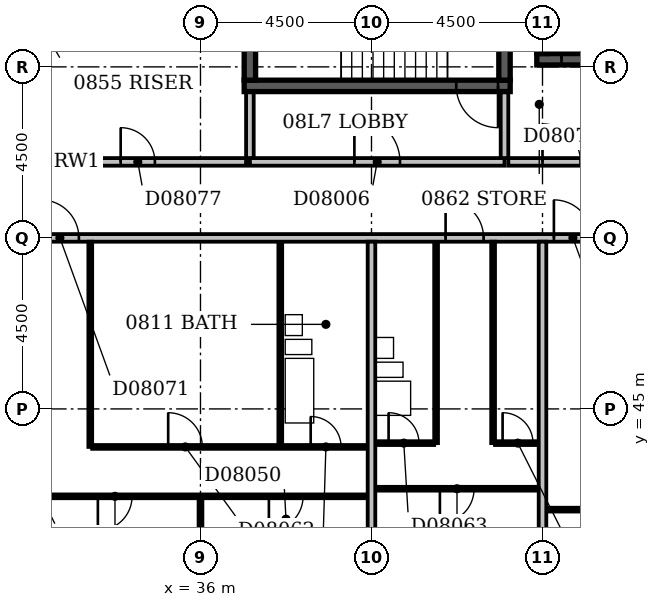
"""IFC4 building model, lengths in metres.
Left out: names, types, materials, properties, quantities, classifications, styles, units other than length and angle.
Written with IfcOpenShell. Run it as: python <this file> out.ifc"""

import sys

from ifc_helpers import new_model, si_unit, direction, frame, frame_2d, origin, place, context, subcontext, project, spatial, rectangle, extrude, element, fill, save


model = new_model("IFC4")
c1 = context("Model", 3, precision=1e-05, world=origin(), true_north=direction((0.0, 1.0)))
c2 = subcontext(c1, "Body", "Model", "MODEL_VIEW")
j1 = project(units=[si_unit("LENGTHUNIT", "METRE"), si_unit("PLANEANGLEUNIT", "RADIAN")], contexts=[c1])
p1 = place(None, origin())
s1 = spatial("IfcSite", under=j1, at=p1, CompositionType="ELEMENT")
p2 = place(p1, origin())
s2 = spatial("IfcBuilding", under=s1, at=p2, CompositionType="ELEMENT")
p3 = place(p2, frame((0.0, 0.0, 39.8)))
s3 = spatial("IfcBuildingStorey", under=s2, at=p3, CompositionType="ELEMENT", Elevation=39.8)
p4 = place(p3, frame((37.15, 53.5, -0.3), z_axis=(0.0, 0.0, 1.0), x_axis=(1.0, 0.0, 0.0)))
e1 = element("IfcWall", 1, at=p4, inside=s3, PredefinedType="SHEAR", context=c2, shape_type="SweptSolid", body=[
    extrude(rectangle(XDim=7.0, YDim=0.3, at=frame_2d((3.5, 0.0))), origin(), (0.0, 0.0, 1.0), 3.6),
])
p5 = place(p4, frame((5.58, 0.0, 0.3)))
e2 = element("IfcOpeningElement", 2, at=p5, cuts=e1, PredefinedType="OPENING", context=c2, shape_type="SweptSolid", body=[
    extrude(rectangle(XDim=1.1, YDim=2.1, at=frame_2d((0.55, 1.05))), frame((0.0, 0.162, 0.0), z_axis=(0.0, -1.0, 0.0), x_axis=(1.0, 0.0, 0.0)), (0.0, 0.0, 1.0), 0.324),
])
for number, where, z_axis, x_axis in (
    (3, (37.3, 53.65, -0.3), (0.0, 0.0, 1.0), (0.0, 1.0, 0.0)),
    (4, (44.0, 53.65, -0.3), (0.0, 0.0, 1.0), (0.0, 1.0, 0.0)),
):
    element("IfcWall", number, at=place(p3, frame(where, z_axis=z_axis, x_axis=x_axis)), inside=s3, PredefinedType="SHEAR", context=c2, shape_type="SweptSolid", body=[
        extrude(rectangle(XDim=4.2, YDim=0.3, at=frame_2d((2.1, 0.0))), origin(), (0.0, 0.0, 1.0), 3.6),
    ])
p6 = place(p3, frame((44.85, 54.2, -0.3), z_axis=(0.0, 0.0, 1.0), x_axis=(1.0, 0.0, 0.0)))
e5 = element("IfcWall", 5, at=p6, inside=s3, PredefinedType="SHEAR", context=c2, shape_type="SweptSolid", body=[
    extrude(rectangle(XDim=2.15, YDim=0.3, at=frame_2d((1.075, 0.0))), origin(), (0.0, 0.0, 1.0), 3.6),
])
p7 = place(p6, frame((0.65, 0.0, 0.3)))
e6 = element("IfcOpeningElement", 6, at=p7, cuts=e5, PredefinedType="OPENING", context=c2, shape_type="SweptSolid", body=[
    extrude(rectangle(XDim=1.0, YDim=2.1, at=frame_2d((0.5, 1.05))), frame((0.0, 0.162, 0.0), z_axis=(0.0, -1.0, 0.0), x_axis=(1.0, 0.0, 0.0)), (0.0, 0.0, 1.0), 0.324),
])
p8 = place(p3, frame((45.0, 54.35, -0.3), z_axis=(0.0, 0.0, 1.0), x_axis=(0.0, 1.0, 0.0)))
e7 = element("IfcWall", 7, at=p8, inside=s3, PredefinedType="SHEAR", context=c2, shape_type="SweptSolid", body=[
    extrude(rectangle(XDim=3.5, YDim=0.3, at=frame_2d((1.75, 0.0))), origin(), (0.0, 0.0, 1.0), 3.6),
])
p9 = place(p3, frame((37.3, 51.5, 0.0), z_axis=(0.0, 0.0, 1.0), x_axis=(1.0, 0.0, 0.0)))
e8 = element("IfcWall", 8, at=p9, inside=s3, PredefinedType="PARTITIONING", context=c2, shape_type="SweptSolid", body=[
    extrude(rectangle(XDim=6.7, YDim=0.2, at=frame_2d((3.35, 0.0))), origin(), (0.0, 0.0, 1.0), 3.3),
])
p10 = place(p9, frame((2.75, 0.0, 0.0)))
e9 = element("IfcOpeningElement", 9, at=p10, cuts=e8, PredefinedType="OPENING", context=c2, shape_type="SweptSolid", body=[
    extrude(rectangle(XDim=1.2, YDim=2.1, at=frame_2d((0.6, 1.05))), frame((0.0, 0.112, 0.0), z_axis=(0.0, -1.0, 0.0), x_axis=(1.0, 0.0, 0.0)), (0.0, 0.0, 1.0), 0.224),
])
for number, where, z_axis, x_axis in (
    (10, (44.0, 51.6, 0.0), (0.0, 0.0, 1.0), (0.0, 1.0, 0.0)),
    (11, (37.3, 51.6, 0.0), (0.0, 0.0, 1.0), (0.0, 1.0, 0.0)),
):
    element("IfcWall", number, at=place(p3, frame(where, z_axis=z_axis, x_axis=x_axis)), inside=s3, PredefinedType="PARTITIONING", context=c2, shape_type="SweptSolid", body=[
        extrude(rectangle(XDim=1.73, YDim=0.2, at=frame_2d((0.865, 0.0))), origin(), (0.0, 0.0, 1.0), 3.3),
    ])
p11 = place(p3, frame((36.0, 36.6, 0.0), z_axis=(0.0, 0.0, 1.0), x_axis=(0.0, 1.0, 0.0)))
e12 = element("IfcWall", 12, at=p11, inside=s3, PredefinedType="PARTITIONING", context=c2, shape_type="SweptSolid", body=[
    extrude(rectangle(XDim=6.05, YDim=0.1, at=frame_2d((3.025, 0.0))), origin(), (0.0, 0.0, 1.0), 2.4),
])
p12 = place(p3, frame((40.5, 36.6, 0.0), z_axis=(0.0, 0.0, 1.0), x_axis=(0.0, 1.0, 0.0)))
e13 = element("IfcWall", 13, at=p12, inside=s3, PredefinedType="PARTITIONING", context=c2, shape_type="SweptSolid", body=[
    extrude(rectangle(XDim=12.8, YDim=0.2, at=frame_2d((6.4, 0.0))), origin(), (0.0, 0.0, 1.0), 3.3),
])
p13 = place(p3, frame((45.0, 36.6, 0.0), z_axis=(0.0, 0.0, 1.0), x_axis=(0.0, 1.0, 0.0)))
e14 = element("IfcWall", 14, at=p13, inside=s3, PredefinedType="PARTITIONING", context=c2, shape_type="SweptSolid", body=[
    extrude(rectangle(XDim=12.8, YDim=0.2, at=frame_2d((6.4, 0.0))), origin(), (0.0, 0.0, 1.0), 2.6),
])
p14 = place(p3, frame((45.1, 42.35, 0.0), z_axis=(0.0, 0.0, 1.0), x_axis=(1.0, 0.0, 0.0)))
e15 = element("IfcWall", 15, at=p14, inside=s3, PredefinedType="PARTITIONING", context=c2, shape_type="SweptSolid", body=[
    extrude(rectangle(XDim=17.8, YDim=0.1, at=frame_2d((8.9, 0.0))), origin(), (0.0, 0.0, 1.0), 3.3),
])
p15 = place(p14, frame((1.7, 0.0, 0.0)))
e16 = element("IfcOpeningElement", 16, at=p15, cuts=e15, PredefinedType="OPENING", context=c2, shape_type="SweptSolid", body=[
    extrude(rectangle(XDim=0.9, YDim=2.1, at=frame_2d((0.45, 1.05))), frame((0.0, 0.062, 0.0), z_axis=(0.0, -1.0, 0.0), x_axis=(1.0, 0.0, 0.0)), (0.0, 0.0, 1.0), 0.124),
])
p16 = place(p14, frame((6.2, 0.0, 0.0)))
e17 = element("IfcOpeningElement", 17, at=p16, cuts=e15, PredefinedType="OPENING", context=c2, shape_type="SweptSolid", body=[
    extrude(rectangle(XDim=0.9, YDim=2.1, at=frame_2d((0.45, 1.05))), frame((0.0, 0.062, 0.0), z_axis=(0.0, -1.0, 0.0), x_axis=(1.0, 0.0, 0.0)), (0.0, 0.0, 1.0), 0.124),
])
p17 = place(p14, frame((10.7, 0.0, 0.0)))
e18 = element("IfcOpeningElement", 18, at=p17, cuts=e15, PredefinedType="OPENING", context=c2, shape_type="SweptSolid", body=[
    extrude(rectangle(XDim=0.9, YDim=2.1, at=frame_2d((0.45, 1.05))), frame((0.0, 0.062, 0.0), z_axis=(0.0, -1.0, 0.0), x_axis=(1.0, 0.0, 0.0)), (0.0, 0.0, 1.0), 0.124),
])
p18 = place(p14, frame((15.2, 0.0, 0.0)))
e19 = element("IfcOpeningElement", 19, at=p18, cuts=e15, PredefinedType="OPENING", context=c2, shape_type="SweptSolid", body=[
    extrude(rectangle(XDim=0.9, YDim=2.1, at=frame_2d((0.45, 1.05))), frame((0.0, 0.062, 0.0), z_axis=(0.0, -1.0, 0.0), x_axis=(1.0, 0.0, 0.0)), (0.0, 0.0, 1.0), 0.124),
])
p19 = place(p3, frame((31.6, 42.7, 0.0), z_axis=(0.0, 0.0, 1.0), x_axis=(1.0, 0.0, 0.0)))
e20 = element("IfcWall", 20, at=p19, inside=s3, PredefinedType="PARTITIONING", context=c2, shape_type="SweptSolid", body=[
    extrude(rectangle(XDim=8.8, YDim=0.1, at=frame_2d((4.4, 0.0))), origin(), (0.0, 0.0, 1.0), 3.3),
])
p20 = place(p19, frame((1.7, 0.0, 0.0)))
e21 = element("IfcOpeningElement", 21, at=p20, cuts=e20, PredefinedType="OPENING", context=c2, shape_type="SweptSolid", body=[
    extrude(rectangle(XDim=0.9, YDim=2.1, at=frame_2d((0.45, 1.05))), frame((0.0, 0.062, 0.0), z_axis=(0.0, -1.0, 0.0), x_axis=(1.0, 0.0, 0.0)), (0.0, 0.0, 1.0), 0.124),
])
p21 = place(p19, frame((6.2, 0.0, 0.0)))
e22 = element("IfcOpeningElement", 22, at=p21, cuts=e20, PredefinedType="OPENING", context=c2, shape_type="SweptSolid", body=[
    extrude(rectangle(XDim=0.9, YDim=2.1, at=frame_2d((0.45, 1.05))), frame((0.0, 0.062, 0.0), z_axis=(0.0, -1.0, 0.0), x_axis=(1.0, 0.0, 0.0)), (0.0, 0.0, 1.0), 0.124),
])
p22 = place(p3, frame((40.6, 42.9, 0.0), z_axis=(0.0, 0.0, 1.0), x_axis=(1.0, 0.0, 0.0)))
e23 = element("IfcWall", 23, at=p22, inside=s3, PredefinedType="PARTITIONING", context=c2, shape_type="SweptSolid", body=[
    extrude(rectangle(XDim=4.3, YDim=0.1, at=frame_2d((2.15, 0.0))), origin(), (0.0, 0.0, 1.0), 3.3),
])
p23 = place(p22, frame((1.7, 0.0, 0.0)))
e24 = element("IfcOpeningElement", 24, at=p23, cuts=e23, PredefinedType="OPENING", context=c2, shape_type="SweptSolid", body=[
    extrude(rectangle(XDim=0.9, YDim=2.1, at=frame_2d((0.45, 1.05))), frame((0.0, 0.062, 0.0), z_axis=(0.0, -1.0, 0.0), x_axis=(1.0, 0.0, 0.0)), (0.0, 0.0, 1.0), 0.124),
])
p24 = place(p3, frame((33.1, 44.0, 0.0), z_axis=(0.0, 0.0, 1.0), x_axis=(0.0, 1.0, 0.0)))
e25 = element("IfcWall", 25, at=p24, inside=s3, PredefinedType="PARTITIONING", context=c2, shape_type="SweptSolid", body=[
    extrude(rectangle(XDim=5.4, YDim=0.1, at=frame_2d((2.7, 0.0))), origin(), (0.0, 0.0, 1.0), 3.3),
])
p25 = place(p3, frame((33.15, 44.0, 0.0), z_axis=(0.0, 0.0, 1.0), x_axis=(1.0, 0.0, 0.0)))
e26 = element("IfcWall", 26, at=p25, inside=s3, PredefinedType="PARTITIONING", context=c2, shape_type="SweptSolid", body=[
    extrude(rectangle(XDim=7.25, YDim=0.1, at=frame_2d((3.625, 0.0))), origin(), (0.0, 0.0, 1.0), 3.3),
])
p26 = place(p25, frame((5.75, 0.0, 0.0)))
e27 = element("IfcOpeningElement", 27, at=p26, cuts=e26, PredefinedType="OPENING", context=c2, shape_type="SweptSolid", body=[
    extrude(rectangle(XDim=0.8, YDim=2.1, at=frame_2d((0.4, 1.05))), frame((0.0, 0.062, 0.0), z_axis=(0.0, -1.0, 0.0), x_axis=(1.0, 0.0, 0.0)), (0.0, 0.0, 1.0), 0.124),
])
p27 = place(p25, frame((2.0, 0.0, 0.0)))
e28 = element("IfcOpeningElement", 28, at=p27, cuts=e26, PredefinedType="OPENING", context=c2, shape_type="SweptSolid", body=[
    extrude(rectangle(XDim=0.9, YDim=2.1, at=frame_2d((0.45, 1.05))), frame((0.0, 0.062, 0.0), z_axis=(0.0, -1.0, 0.0), x_axis=(1.0, 0.0, 0.0)), (0.0, 0.0, 1.0), 0.124),
])
p28 = place(p3, frame((38.1, 44.05, 0.0), z_axis=(0.0, 0.0, 1.0), x_axis=(0.0, 1.0, 0.0)))
e29 = element("IfcWall", 29, at=p28, inside=s3, PredefinedType="PLUMBINGWALL", context=c2, shape_type="SweptSolid", body=[
    extrude(rectangle(XDim=5.35, YDim=0.1, at=frame_2d((2.675, 0.0))), origin(), (0.0, 0.0, 1.0), 3.3),
])
p29 = place(p3, frame((40.6, 44.1, 0.0), z_axis=(0.0, 0.0, 1.0), x_axis=(1.0, 0.0, 0.0)))
e30 = element("IfcWall", 30, at=p29, inside=s3, PredefinedType="PARTITIONING", context=c2, shape_type="SweptSolid", body=[
    extrude(rectangle(XDim=1.55, YDim=0.1, at=frame_2d((0.775, 0.0))), origin(), (0.0, 0.0, 1.0), 3.3),
])
p30 = place(p29, frame((0.35, 0.0, 0.0)))
e31 = element("IfcOpeningElement", 31, at=p30, cuts=e30, PredefinedType="OPENING", context=c2, shape_type="SweptSolid", body=[
    extrude(rectangle(XDim=0.8, YDim=2.1, at=frame_2d((0.4, 1.05))), frame((0.0, 0.062, 0.0), z_axis=(0.0, -1.0, 0.0), x_axis=(1.0, 0.0, 0.0)), (0.0, 0.0, 1.0), 0.124),
])
p31 = place(p3, frame((42.2, 44.1, 0.0), z_axis=(0.0, 0.0, 1.0), x_axis=(0.0, 1.0, 0.0)))
e32 = element("IfcWall", 32, at=p31, inside=s3, PredefinedType="PLUMBINGWALL", context=c2, shape_type="SweptSolid", body=[
    extrude(rectangle(XDim=5.3, YDim=0.1, at=frame_2d((2.65, 0.0))), origin(), (0.0, 0.0, 1.0), 3.3),
])
p32 = place(p3, frame((43.7, 44.1, 0.0), z_axis=(0.0, 0.0, 1.0), x_axis=(0.0, 1.0, 0.0)))
e33 = element("IfcWall", 33, at=p32, inside=s3, PredefinedType="PARTITIONING", context=c2, shape_type="SweptSolid", body=[
    extrude(rectangle(XDim=5.3, YDim=0.1, at=frame_2d((2.65, 0.0))), origin(), (0.0, 0.0, 1.0), 3.3),
])
p33 = place(p3, frame((43.75, 44.1, 0.0), z_axis=(0.0, 0.0, 1.0), x_axis=(1.0, 0.0, 0.0)))
e34 = element("IfcWall", 34, at=p33, inside=s3, PredefinedType="PARTITIONING", context=c2, shape_type="SweptSolid", body=[
    extrude(rectangle(XDim=1.15, YDim=0.1, at=frame_2d((0.575, 0.0))), origin(), (0.0, 0.0, 1.0), 3.3),
])
p34 = place(p33, frame((0.2, 0.0, 0.0)))
e35 = element("IfcOpeningElement", 35, at=p34, cuts=e34, PredefinedType="OPENING", context=c2, shape_type="SweptSolid", body=[
    extrude(rectangle(XDim=0.8, YDim=2.1, at=frame_2d((0.4, 1.05))), frame((0.0, 0.062, 0.0), z_axis=(0.0, -1.0, 0.0), x_axis=(1.0, 0.0, 0.0)), (0.0, 0.0, 1.0), 0.124),
])
p35 = place(p3, frame((9.1, 49.5, 0.0), z_axis=(0.0, 0.0, 1.0), x_axis=(1.0, 0.0, 0.0)))
e36 = element("IfcWall", 36, at=p35, inside=s3, PredefinedType="PARTITIONING", context=c2, shape_type="SweptSolid", body=[
    extrude(rectangle(XDim=57.8, YDim=0.2, at=frame_2d((28.9, 0.0))), origin(), (0.0, 0.0, 1.0), 3.3),
])
p36 = place(p35, frame((14.95, 0.0, 0.0)))
e37 = element("IfcOpeningElement", 37, at=p36, cuts=e36, PredefinedType="OPENING", context=c2, shape_type="SweptSolid", body=[
    extrude(rectangle(XDim=1.0, YDim=2.1, at=frame_2d((0.5, 1.05))), frame((0.0, 0.112, 0.0), z_axis=(0.0, -1.0, 0.0), x_axis=(1.0, 0.0, 0.0)), (0.0, 0.0, 1.0), 0.224),
])
p37 = place(p35, frame((19.85, 0.0, 0.0)))
e38 = element("IfcOpeningElement", 38, at=p37, cuts=e36, PredefinedType="OPENING", context=c2, shape_type="SweptSolid", body=[
    extrude(rectangle(XDim=1.0, YDim=2.1, at=frame_2d((0.5, 1.05))), frame((0.0, 0.112, 0.0), z_axis=(0.0, -1.0, 0.0), x_axis=(1.0, 0.0, 0.0)), (0.0, 0.0, 1.0), 0.224),
])
p38 = place(p35, frame((22.7, 0.0, 0.0)))
e39 = element("IfcOpeningElement", 39, at=p38, cuts=e36, PredefinedType="OPENING", context=c2, shape_type="SweptSolid", body=[
    extrude(rectangle(XDim=1.0, YDim=2.1, at=frame_2d((0.5, 1.05))), frame((0.0, 0.112, 0.0), z_axis=(0.0, -1.0, 0.0), x_axis=(1.0, 0.0, 0.0)), (0.0, 0.0, 1.0), 0.224),
])
p39 = place(p35, frame((33.35, 0.0, 0.0)))
e40 = element("IfcOpeningElement", 40, at=p39, cuts=e36, PredefinedType="OPENING", context=c2, shape_type="SweptSolid", body=[
    extrude(rectangle(XDim=1.0, YDim=2.1, at=frame_2d((0.5, 1.05))), frame((0.0, 0.112, 0.0), z_axis=(0.0, -1.0, 0.0), x_axis=(1.0, 0.0, 0.0)), (0.0, 0.0, 1.0), 0.224),
])
p40 = place(p35, frame((36.2, 0.0, 0.0)))
e41 = element("IfcOpeningElement", 41, at=p40, cuts=e36, PredefinedType="OPENING", context=c2, shape_type="SweptSolid", body=[
    extrude(rectangle(XDim=1.0, YDim=2.1, at=frame_2d((0.5, 1.05))), frame((0.0, 0.112, 0.0), z_axis=(0.0, -1.0, 0.0), x_axis=(1.0, 0.0, 0.0)), (0.0, 0.0, 1.0), 0.224),
])
p41 = place(p35, frame((54.15, 0.0, 0.0)))
e42 = element("IfcOpeningElement", 42, at=p41, cuts=e36, PredefinedType="OPENING", context=c2, shape_type="SweptSolid", body=[
    extrude(rectangle(XDim=1.0, YDim=2.1, at=frame_2d((0.5, 1.05))), frame((0.0, 0.112, 0.0), z_axis=(0.0, -1.0, 0.0), x_axis=(1.0, 0.0, 0.0)), (0.0, 0.0, 1.0), 0.224),
])
p42 = place(p35, frame((6.15, 0.0, 0.0)))
e43 = element("IfcOpeningElement", 43, at=p42, cuts=e36, PredefinedType="OPENING", context=c2, shape_type="SweptSolid", body=[
    extrude(rectangle(XDim=0.9, YDim=2.1, at=frame_2d((0.45, 1.05))), frame((0.0, 0.112, 0.0), z_axis=(0.0, -1.0, 0.0), x_axis=(1.0, 0.0, 0.0)), (0.0, 0.0, 1.0), 0.224),
])
p43 = place(p3, frame((27.9, 51.5, 0.0), z_axis=(0.0, 0.0, 1.0), x_axis=(1.0, 0.0, 0.0)))
e44 = element("IfcWall", 44, at=p43, inside=s3, PredefinedType="PARTITIONING", context=c2, shape_type="SweptSolid", body=[
    extrude(rectangle(XDim=9.3, YDim=0.2, at=frame_2d((4.65, 0.0))), origin(), (0.0, 0.0, 1.0), 3.3),
])
p44 = place(p43, frame((1.2, 0.0, 0.0)))
e45 = element("IfcOpeningElement", 45, at=p44, cuts=e44, PredefinedType="OPENING", context=c2, shape_type="SweptSolid", body=[
    extrude(rectangle(XDim=1.0, YDim=2.1, at=frame_2d((0.5, 1.05))), frame((0.0, 0.112, 0.0), z_axis=(0.0, -1.0, 0.0), x_axis=(1.0, 0.0, 0.0)), (0.0, 0.0, 1.0), 0.224),
])
p45 = place(p43, frame((6.0, 0.0, 0.0)))
e46 = element("IfcOpeningElement", 46, at=p45, cuts=e44, PredefinedType="OPENING", context=c2, shape_type="SweptSolid", body=[
    extrude(rectangle(XDim=0.9, YDim=2.1, at=frame_2d((0.45, 1.05))), frame((0.0, 0.112, 0.0), z_axis=(0.0, -1.0, 0.0), x_axis=(1.0, 0.0, 0.0)), (0.0, 0.0, 1.0), 0.224),
])
p46 = place(p3, frame((44.1, 51.5, 0.0), z_axis=(0.0, 0.0, 1.0), x_axis=(1.0, 0.0, 0.0)))
e47 = element("IfcWall", 47, at=p46, inside=s3, PredefinedType="PARTITIONING", context=c2, shape_type="SweptSolid", body=[
    extrude(rectangle(XDim=2.8, YDim=0.2, at=frame_2d((1.4, 0.0))), origin(), (0.0, 0.0, 1.0), 3.3),
])
p47 = place(p46, frame((0.9, 0.0, 0.0)))
e48 = element("IfcOpeningElement", 48, at=p47, cuts=e47, PredefinedType="OPENING", context=c2, shape_type="SweptSolid", body=[
    extrude(rectangle(XDim=1.0, YDim=2.1, at=frame_2d((0.5, 1.05))), frame((0.0, 0.112, 0.0), z_axis=(0.0, -1.0, 0.0), x_axis=(1.0, 0.0, 0.0)), (0.0, 0.0, 1.0), 0.224),
])
p48 = place(p10, origin())
e49 = element("IfcDoor", 49, at=p48, inside=s3, OperationType="SINGLE_SWING_LEFT", PredefinedType="DOOR", context=c2, shape_type="SweptSolid", body=[
    extrude(rectangle(XDim=1.2, YDim=2.1, at=frame_2d((0.6, 1.05))), frame((0.0, 0.025, 0.0), z_axis=(0.0, -1.0, 0.0), x_axis=(1.0, 0.0, 0.0)), (0.0, 0.0, 1.0), 0.05),
])
fill(e9, e49)
p49 = place(p7, origin())
e50 = element("IfcDoor", 50, at=p49, inside=s3, OperationType="SINGLE_SWING_LEFT", PredefinedType="DOOR", context=c2, shape_type="SweptSolid", body=[
    extrude(rectangle(XDim=1.0, YDim=2.1, at=frame_2d((0.5, 1.05))), frame((0.0, 0.025, 0.0), z_axis=(0.0, -1.0, 0.0), x_axis=(1.0, 0.0, 0.0)), (0.0, 0.0, 1.0), 0.05),
])
fill(e6, e50)
p50 = place(p5, origin())
e51 = element("IfcDoor", 51, at=p50, inside=s3, OperationType="SINGLE_SWING_RIGHT", PredefinedType="DOOR", context=c2, shape_type="SweptSolid", body=[
    extrude(rectangle(XDim=1.1, YDim=2.1, at=frame_2d((0.55, 1.05))), frame((0.0, 0.025, 0.0), z_axis=(0.0, -1.0, 0.0), x_axis=(1.0, 0.0, 0.0)), (0.0, 0.0, 1.0), 0.05),
])
fill(e2, e51)
p51 = place(p20, frame((0.9, 0.0, 0.0), z_axis=(0.0, 0.0, 1.0), x_axis=(-1.0, 0.0, 0.0)))
e52 = element("IfcDoor", 52, at=p51, inside=s3, OperationType="SINGLE_SWING_RIGHT", PredefinedType="DOOR", context=c2, shape_type="SweptSolid", body=[
    extrude(rectangle(XDim=0.9, YDim=2.1, at=frame_2d((0.45, 1.05))), frame((0.0, 0.025, 0.0), z_axis=(0.0, -1.0, 0.0), x_axis=(1.0, 0.0, 0.0)), (0.0, 0.0, 1.0), 0.05),
])
fill(e21, e52)
p52 = place(p21, frame((0.9, 0.0, 0.0), z_axis=(0.0, 0.0, 1.0), x_axis=(-1.0, 0.0, 0.0)))
e53 = element("IfcDoor", 53, at=p52, inside=s3, OperationType="SINGLE_SWING_RIGHT", PredefinedType="DOOR", context=c2, shape_type="SweptSolid", body=[
    extrude(rectangle(XDim=0.9, YDim=2.1, at=frame_2d((0.45, 1.05))), frame((0.0, 0.025, 0.0), z_axis=(0.0, -1.0, 0.0), x_axis=(1.0, 0.0, 0.0)), (0.0, 0.0, 1.0), 0.05),
])
fill(e22, e53)
p53 = place(p23, frame((0.9, 0.0, 0.0), z_axis=(0.0, 0.0, 1.0), x_axis=(-1.0, 0.0, 0.0)))
e54 = element("IfcDoor", 54, at=p53, inside=s3, OperationType="SINGLE_SWING_RIGHT", PredefinedType="DOOR", context=c2, shape_type="SweptSolid", body=[
    extrude(rectangle(XDim=0.9, YDim=2.1, at=frame_2d((0.45, 1.05))), frame((0.0, 0.025, 0.0), z_axis=(0.0, -1.0, 0.0), x_axis=(1.0, 0.0, 0.0)), (0.0, 0.0, 1.0), 0.05),
])
fill(e24, e54)
p54 = place(p26, origin())
e55 = element("IfcDoor", 55, at=p54, inside=s3, OperationType="SINGLE_SWING_LEFT", PredefinedType="DOOR", context=c2, shape_type="SweptSolid", body=[
    extrude(rectangle(XDim=0.8, YDim=2.1, at=frame_2d((0.4, 1.05))), frame((0.0, 0.025, 0.0), z_axis=(0.0, -1.0, 0.0), x_axis=(1.0, 0.0, 0.0)), (0.0, 0.0, 1.0), 0.05),
])
fill(e27, e55)
p55 = place(p27, origin())
e56 = element("IfcDoor", 56, at=p55, inside=s3, OperationType="SINGLE_SWING_LEFT", PredefinedType="DOOR", context=c2, shape_type="SweptSolid", body=[
    extrude(rectangle(XDim=0.9, YDim=2.1, at=frame_2d((0.45, 1.05))), frame((0.0, 0.025, 0.0), z_axis=(0.0, -1.0, 0.0), x_axis=(1.0, 0.0, 0.0)), (0.0, 0.0, 1.0), 0.05),
])
fill(e28, e56)
p56 = place(p30, origin())
e57 = element("IfcDoor", 57, at=p56, inside=s3, OperationType="SINGLE_SWING_LEFT", PredefinedType="DOOR", context=c2, shape_type="SweptSolid", body=[
    extrude(rectangle(XDim=0.8, YDim=2.1, at=frame_2d((0.4, 1.05))), frame((0.0, 0.025, 0.0), z_axis=(0.0, -1.0, 0.0), x_axis=(1.0, 0.0, 0.0)), (0.0, 0.0, 1.0), 0.05),
])
fill(e31, e57)
p57 = place(p34, origin())
e58 = element("IfcDoor", 58, at=p57, inside=s3, OperationType="SINGLE_SWING_LEFT", PredefinedType="DOOR", context=c2, shape_type="SweptSolid", body=[
    extrude(rectangle(XDim=0.8, YDim=2.1, at=frame_2d((0.4, 1.05))), frame((0.0, 0.025, 0.0), z_axis=(0.0, -1.0, 0.0), x_axis=(1.0, 0.0, 0.0)), (0.0, 0.0, 1.0), 0.05),
])
fill(e35, e58)
p58 = place(p38, origin())
e59 = element("IfcDoor", 59, at=p58, inside=s3, OperationType="SINGLE_SWING_LEFT", PredefinedType="DOOR", context=c2, shape_type="SweptSolid", body=[
    extrude(rectangle(XDim=1.0, YDim=2.1, at=frame_2d((0.5, 1.05))), frame((0.0, 0.025, 0.0), z_axis=(0.0, -1.0, 0.0), x_axis=(1.0, 0.0, 0.0)), (0.0, 0.0, 1.0), 0.05),
])
fill(e39, e59)
p59 = place(p39, origin())
e60 = element("IfcDoor", 60, at=p59, inside=s3, OperationType="SINGLE_SWING_LEFT", PredefinedType="DOOR", context=c2, shape_type="SweptSolid", body=[
    extrude(rectangle(XDim=1.0, YDim=2.1, at=frame_2d((0.5, 1.05))), frame((0.0, 0.025, 0.0), z_axis=(0.0, -1.0, 0.0), x_axis=(1.0, 0.0, 0.0)), (0.0, 0.0, 1.0), 0.05),
])
fill(e40, e60)
p60 = place(p40, origin())
e61 = element("IfcDoor", 61, at=p60, inside=s3, OperationType="SINGLE_SWING_LEFT", PredefinedType="DOOR", context=c2, shape_type="SweptSolid", body=[
    extrude(rectangle(XDim=1.0, YDim=2.1, at=frame_2d((0.5, 1.05))), frame((0.0, 0.025, 0.0), z_axis=(0.0, -1.0, 0.0), x_axis=(1.0, 0.0, 0.0)), (0.0, 0.0, 1.0), 0.05),
])
fill(e41, e61)
p61 = place(p45, origin())
e62 = element("IfcDoor", 62, at=p61, inside=s3, OperationType="SINGLE_SWING_LEFT", PredefinedType="DOOR", context=c2, shape_type="SweptSolid", body=[
    extrude(rectangle(XDim=0.9, YDim=2.1, at=frame_2d((0.45, 1.05))), frame((0.0, 0.025, 0.0), z_axis=(0.0, -1.0, 0.0), x_axis=(1.0, 0.0, 0.0)), (0.0, 0.0, 1.0), 0.05),
])
fill(e46, e62)
p62 = place(p47, origin())
e63 = element("IfcDoor", 63, at=p62, inside=s3, OperationType="SINGLE_SWING_LEFT", PredefinedType="DOOR", context=c2, shape_type="SweptSolid", body=[
    extrude(rectangle(XDim=1.0, YDim=2.1, at=frame_2d((0.5, 1.05))), frame((0.0, 0.025, 0.0), z_axis=(0.0, -1.0, 0.0), x_axis=(1.0, 0.0, 0.0)), (0.0, 0.0, 1.0), 0.05),
])
fill(e48, e63)
save(model, sys.argv[1])
